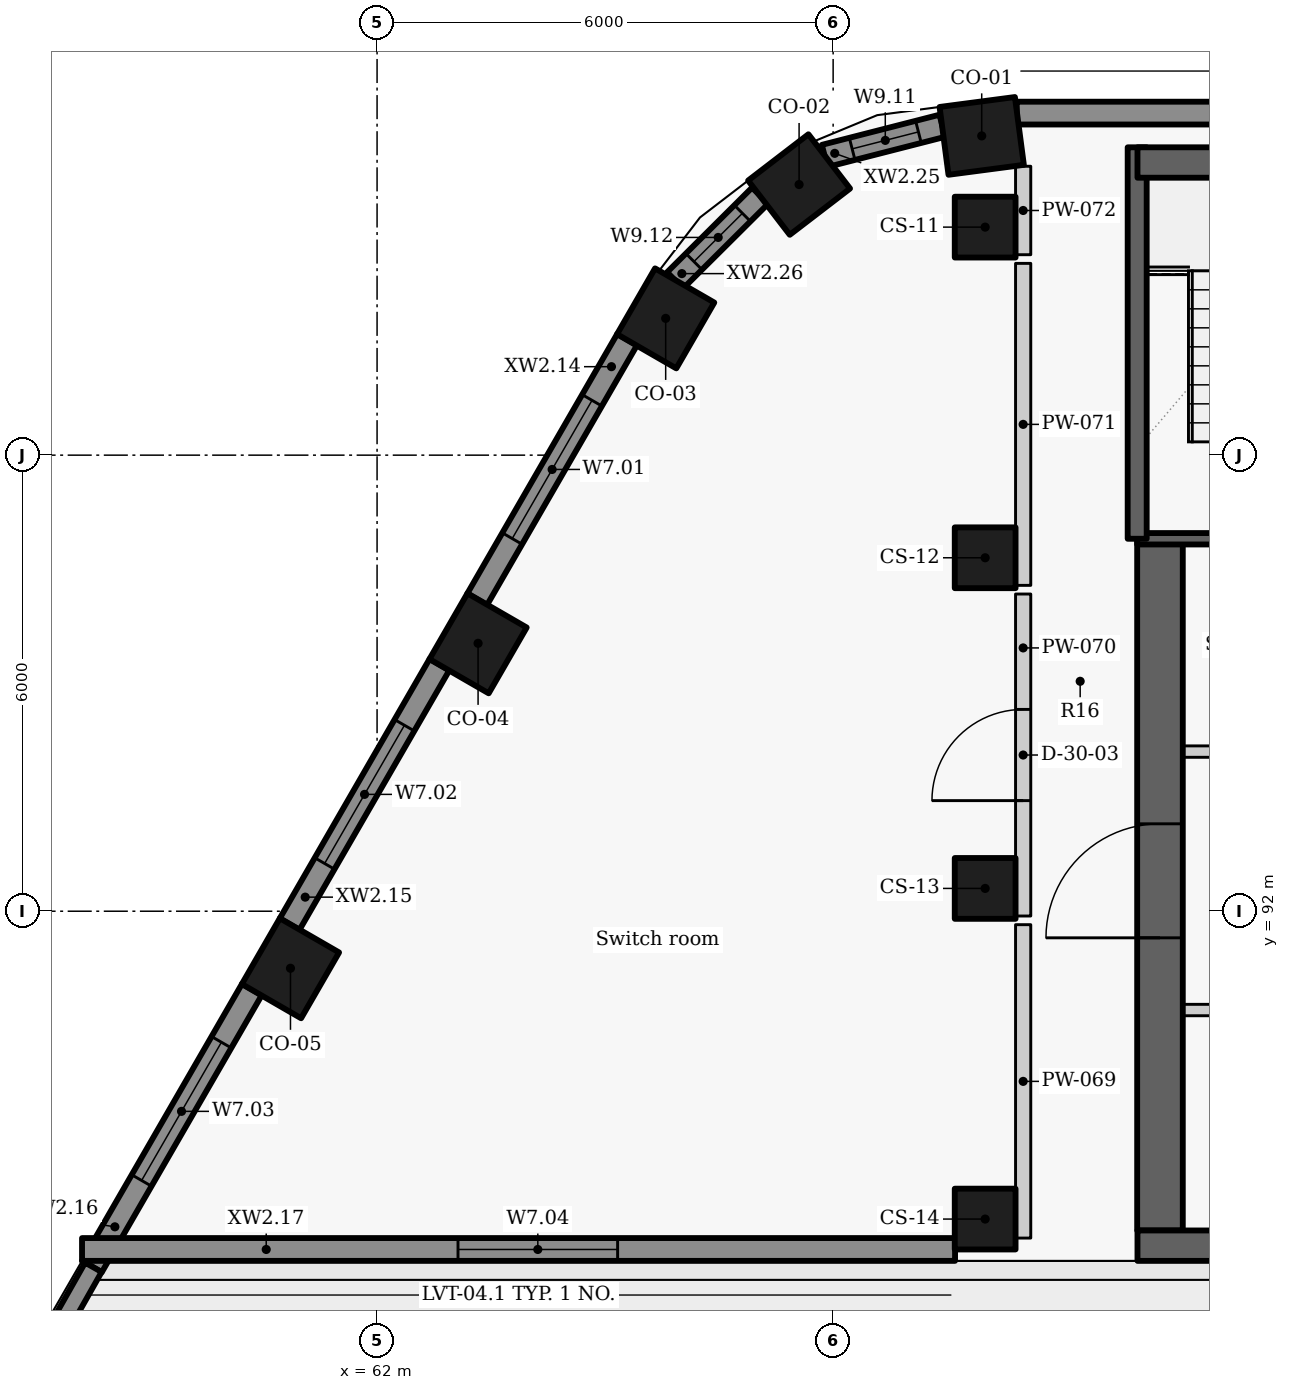
"""IFC4 building model, lengths in metres.
Left out: names, types, materials, properties, quantities, classifications, styles, units other than length and angle.
Written with IfcOpenShell. Run it as: python <this file> out.ifc"""

import sys

from ifc_helpers import new_model, si_unit, direction, frame, frame_2d, origin, origin_2d, place, context, subcontext, project, spatial, rectangle, extrude, element, fill, save


model = new_model("IFC4")
c1 = context("Model", 3, precision=1e-05, world=origin(), true_north=direction((0.0, 1.0)))
c2 = subcontext(c1, "Body", "Model", "MODEL_VIEW")
j1 = project(units=[si_unit("LENGTHUNIT", "METRE"), si_unit("PLANEANGLEUNIT", "RADIAN")], contexts=[c1])
p1 = place(None, origin())
s1 = spatial("IfcSite", under=j1, at=p1, CompositionType="ELEMENT")
p2 = place(p1, origin())
s2 = spatial("IfcBuilding", under=s1, at=p2, CompositionType="ELEMENT")
p3 = place(p2, frame((0.0, 0.0, 276.0)))
s3 = spatial("IfcBuildingStorey", under=s2, at=p3, CompositionType="ELEMENT", Elevation=276.0)
for number, where, z_axis, x_axis in (
    (1, (69.955, 102.2, 0.0), (0.0, 0.0, 1.0), (-0.991, -0.131, 0.0)),
    (2, (67.552, 101.56, 0.0), (0.0, 0.0, 1.0), (-0.793, -0.609, 0.0)),
    (3, (65.797, 99.8, 0.0), (0.0, 0.0, 1.0), (-0.5, -0.866, 0.0)),
    (4, (63.329, 95.525, 0.0), (0.0, 0.0, 1.0), (-0.5, -0.866, 0.0)),
    (5, (60.861, 91.25, 0.0), (0.0, 0.0, 1.0), (-0.5, -0.866, 0.0)),
):
    element("IfcColumn", number, at=place(p3, frame(where, z_axis=z_axis, x_axis=x_axis)), inside=s3, PredefinedType="COLUMN", context=c2, shape_type="SweptSolid", body=[
        extrude(rectangle(XDim=1.0, YDim=0.9, at=origin_2d()), origin(), (0.0, 0.0, 1.0), 3.6),
    ])
for number, where, z_axis, x_axis in (
    (6, (70.0, 101.0, 0.0), (0.0, 0.0, 1.0), (0.0, -1.0, 0.0)),
    (7, (70.0, 96.65, 0.0), (0.0, 0.0, 1.0), (0.0, -1.0, 0.0)),
    (8, (70.0, 92.3, 0.0), (0.0, 0.0, 1.0), (0.0, -1.0, 0.0)),
    (9, (70.0, 87.95, 0.0), (0.0, 0.0, 1.0), (0.0, -1.0, 0.0)),
):
    element("IfcColumn", number, at=place(p3, frame(where, z_axis=z_axis, x_axis=x_axis)), inside=s3, PredefinedType="COLUMN", context=c2, shape_type="SweptSolid", body=[
        extrude(rectangle(XDim=0.8, YDim=0.8, at=origin_2d()), origin(), (0.0, 0.0, 1.0), 3.6),
    ])
p4 = place(p3, frame((65.289, 99.52, 0.0), z_axis=(0.0, 0.0, 1.0), x_axis=(-0.499986771468, -0.866033041146, 0.0)))
e10 = element("IfcWall", 10, at=p4, inside=s3, PredefinedType="SOLIDWALL", context=c2, shape_type="SweptSolid", body=[
    extrude(rectangle(XDim=3.944, YDim=0.3, at=frame_2d((1.972, 0.0))), origin(), (0.0, 0.0, 1.0), 2.725),
])
p5 = place(p4, frame((0.922, 0.0, 0.9)))
e11 = element("IfcOpeningElement", 11, at=p5, cuts=e10, PredefinedType="OPENING", context=c2, shape_type="SweptSolid", body=[
    extrude(rectangle(XDim=2.1, YDim=1.1, at=frame_2d((1.05, 0.55))), frame((0.0, 0.16, 0.0), z_axis=(0.0, -1.0, 0.0), x_axis=(1.0, 0.0, 0.0)), (0.0, 0.0, 1.0), 0.32),
])
p6 = place(p3, frame((62.821, 95.245, 0.0), z_axis=(0.0, 0.0, 1.0), x_axis=(-0.499986771468, -0.866033041146, 0.0)))
e12 = element("IfcWall", 12, at=p6, inside=s3, PredefinedType="SOLIDWALL", context=c2, shape_type="SweptSolid", body=[
    extrude(rectangle(XDim=3.944, YDim=0.3, at=frame_2d((1.972, 0.0))), origin(), (0.0, 0.0, 1.0), 2.725),
])
p7 = place(p6, frame((0.922, 0.0, 0.9)))
e13 = element("IfcOpeningElement", 13, at=p7, cuts=e12, PredefinedType="OPENING", context=c2, shape_type="SweptSolid", body=[
    extrude(rectangle(XDim=2.1, YDim=1.1, at=frame_2d((1.05, 0.55))), frame((0.0, 0.16, 0.0), z_axis=(0.0, -1.0, 0.0), x_axis=(1.0, 0.0, 0.0)), (0.0, 0.0, 1.0), 0.32),
])
p8 = place(p3, frame((60.353, 90.97, 0.0), z_axis=(0.0, 0.0, 1.0), x_axis=(-0.499981865284, -0.866035873614, 0.0)))
e14 = element("IfcWall", 14, at=p8, inside=s3, PredefinedType="SOLIDWALL", context=c2, shape_type="SweptSolid", body=[
    extrude(rectangle(XDim=4.209, YDim=0.3, at=frame_2d((2.104, 0.0))), origin(), (0.0, 0.0, 1.0), 2.725),
])
p9 = place(p8, frame((0.801, 0.0, 0.9)))
e15 = element("IfcOpeningElement", 15, at=p9, cuts=e14, PredefinedType="OPENING", context=c2, shape_type="SweptSolid", body=[
    extrude(rectangle(XDim=2.1, YDim=1.1, at=frame_2d((1.05, 0.55))), frame((0.0, 0.16, 0.0), z_axis=(0.0, -1.0, 0.0), x_axis=(1.0, 0.0, 0.0)), (0.0, 0.0, 1.0), 0.32),
])
p10 = place(p3, frame((58.118, 87.55, 0.0), z_axis=(0.0, 0.0, 1.0), x_axis=(1.0, 0.0, 0.0)))
e16 = element("IfcWall", 16, at=p10, inside=s3, PredefinedType="SOLIDWALL", context=c2, shape_type="SweptSolid", body=[
    extrude(rectangle(XDim=11.486, YDim=0.3, at=frame_2d((5.743, 0.0))), origin(), (0.0, 0.0, 1.0), 2.725),
])
p11 = place(p10, frame((4.946, 0.0, 0.9)))
e17 = element("IfcOpeningElement", 17, at=p11, cuts=e16, PredefinedType="OPENING", context=c2, shape_type="SweptSolid", body=[
    extrude(rectangle(XDim=2.1, YDim=1.1, at=frame_2d((1.05, 0.55))), frame((0.0, 0.16, 0.0), z_axis=(0.0, -1.0, 0.0), x_axis=(1.0, 0.0, 0.0)), (0.0, 0.0, 1.0), 0.32),
])
p12 = place(p3, frame((89.549, 102.5, 0.0), z_axis=(0.0, 0.0, 1.0), x_axis=(-1.0, 0.0, 0.0)))
e18 = element("IfcWall", 18, at=p12, inside=s3, PredefinedType="SOLIDWALL", context=c2, shape_type="SweptSolid", body=[
    extrude(rectangle(XDim=19.134, YDim=0.3, at=frame_2d((9.567, 0.0))), origin(), (0.0, 0.0, 1.0), 2.725),
])
p13 = place(p3, frame((69.437, 102.333, 0.0), z_axis=(0.0, 0.0, 1.0), x_axis=(-0.968770279168, -0.247959968947, 0.0)))
e19 = element("IfcWall", 19, at=p13, inside=s3, PredefinedType="SOLIDWALL", context=c2, shape_type="SweptSolid", body=[
    extrude(rectangle(XDim=1.598, YDim=0.3, at=frame_2d((0.799, 0.0))), origin(), (0.0, 0.0, 1.0), 2.725),
])
p14 = place(p13, frame((0.325, 0.0, 0.9)))
e20 = element("IfcOpeningElement", 20, at=p14, cuts=e19, PredefinedType="OPENING", context=c2, shape_type="SweptSolid", body=[
    extrude(rectangle(XDim=0.9, YDim=1.1, at=frame_2d((0.45, 0.55))), frame((0.0, 0.16, 0.0), z_axis=(0.0, -1.0, 0.0), x_axis=(1.0, 0.0, 0.0)), (0.0, 0.0, 1.0), 0.32),
])
p15 = place(p3, frame((67.039, 101.414, 0.0), z_axis=(0.0, 0.0, 1.0), x_axis=(-0.708575326337, -0.705635179754, 0.0)))
e21 = element("IfcWall", 21, at=p15, inside=s3, PredefinedType="SOLIDWALL", context=c2, shape_type="SweptSolid", body=[
    extrude(rectangle(XDim=1.578, YDim=0.3, at=frame_2d((0.789, 0.0))), origin(), (0.0, 0.0, 1.0), 2.725),
])
p16 = place(p15, frame((0.328, 0.0, 0.9)))
e22 = element("IfcOpeningElement", 22, at=p16, cuts=e21, PredefinedType="OPENING", context=c2, shape_type="SweptSolid", body=[
    extrude(rectangle(XDim=0.9, YDim=1.1, at=frame_2d((0.45, 0.55))), frame((0.0, 0.16, 0.0), z_axis=(0.0, -1.0, 0.0), x_axis=(1.0, 0.0, 0.0)), (0.0, 0.0, 1.0), 0.32),
])
p17 = place(p3, frame((58.268, 87.316, 0.0), z_axis=(0.0, 0.0, 1.0), x_axis=(-0.492736734633, -0.870178435922, 0.0)))
e23 = element("IfcWall", 23, at=p17, inside=s3, PredefinedType="PARAPET", context=c2, shape_type="SweptSolid", body=[
    extrude(rectangle(XDim=5.918, YDim=0.25, at=frame_2d((2.959, 0.0))), origin(), (0.0, 0.0, 1.0), 1.1),
])
p18 = place(p3, frame((85.4, 90.7, 0.0), z_axis=(0.0, 0.0, 1.0), x_axis=(-1.0, 0.0, 0.0)))
e24 = element("IfcWall", 24, at=p18, inside=s3, PredefinedType="PARTITIONING", context=c2, shape_type="SweptSolid", body=[
    extrude(rectangle(XDim=13.4, YDim=0.15, at=frame_2d((6.7, 0.0))), origin(), (0.0, 0.0, 1.0), 3.325),
])
p19 = place(p18, frame((11.325, 0.0, 0.0)))
e25 = element("IfcOpeningElement", 25, at=p19, cuts=e24, PredefinedType="OPENING", context=c2, shape_type="SweptSolid", body=[
    extrude(rectangle(XDim=0.9, YDim=2.1, at=frame_2d((0.45, 1.05))), frame((0.0, 0.085, 0.0), z_axis=(0.0, -1.0, 0.0), x_axis=(1.0, 0.0, 0.0)), (0.0, 0.0, 1.0), 0.17),
])
p20 = place(p18, frame((9.0, 0.0, 0.0)))
e26 = element("IfcOpeningElement", 26, at=p20, cuts=e24, PredefinedType="OPENING", context=c2, shape_type="SweptSolid", body=[
    extrude(rectangle(XDim=0.9, YDim=2.1, at=frame_2d((0.45, 1.05))), frame((0.0, 0.085, 0.0), z_axis=(0.0, -1.0, 0.0), x_axis=(1.0, 0.0, 0.0)), (0.0, 0.0, 1.0), 0.17),
])
p21 = place(p18, frame((6.3, 0.0, 0.0)))
e27 = element("IfcOpeningElement", 27, at=p21, cuts=e24, PredefinedType="OPENING", context=c2, shape_type="SweptSolid", body=[
    extrude(rectangle(XDim=0.9, YDim=2.1, at=frame_2d((0.45, 1.05))), frame((0.0, 0.085, 0.0), z_axis=(0.0, -1.0, 0.0), x_axis=(1.0, 0.0, 0.0)), (0.0, 0.0, 1.0), 0.17),
])
p22 = place(p18, frame((3.6, 0.0, 0.0)))
e28 = element("IfcOpeningElement", 28, at=p22, cuts=e24, PredefinedType="OPENING", context=c2, shape_type="SweptSolid", body=[
    extrude(rectangle(XDim=0.9, YDim=2.1, at=frame_2d((0.45, 1.05))), frame((0.0, 0.085, 0.0), z_axis=(0.0, -1.0, 0.0), x_axis=(1.0, 0.0, 0.0)), (0.0, 0.0, 1.0), 0.17),
])
p23 = place(p18, frame((0.9, 0.0, 0.0)))
e29 = element("IfcOpeningElement", 29, at=p23, cuts=e24, PredefinedType="OPENING", context=c2, shape_type="SweptSolid", body=[
    extrude(rectangle(XDim=0.9, YDim=2.1, at=frame_2d((0.45, 1.05))), frame((0.0, 0.085, 0.0), z_axis=(0.0, -1.0, 0.0), x_axis=(1.0, 0.0, 0.0)), (0.0, 0.0, 1.0), 0.17),
])
p24 = place(p3, frame((72.3, 87.8, -0.275), z_axis=(0.0, 0.0, 1.0), x_axis=(0.0, 1.0, 0.0)))
e30 = element("IfcWall", 30, at=p24, inside=s3, PredefinedType="SHEAR", context=c2, shape_type="SweptSolid", body=[
    extrude(rectangle(XDim=9.1, YDim=0.6, at=frame_2d((4.55, 0.0))), origin(), (0.0, 0.0, 1.0), 3.6),
])
p25 = place(p24, frame((3.85, 0.0, 0.275)))
e31 = element("IfcOpeningElement", 31, at=p25, cuts=e30, PredefinedType="OPENING", context=c2, shape_type="SweptSolid", body=[
    extrude(rectangle(XDim=1.5, YDim=2.1, at=frame_2d((0.75, 1.05))), frame((0.0, 0.31, 0.0), z_axis=(0.0, -1.0, 0.0), x_axis=(1.0, 0.0, 0.0)), (0.0, 0.0, 1.0), 0.62),
])
p26 = place(p3, frame((72.0, 94.1, 0.0), z_axis=(0.0, 0.0, 1.0), x_axis=(1.0, 0.0, 0.0)))
e32 = element("IfcWall", 32, at=p26, inside=s3, PredefinedType="PARTITIONING", context=c2, shape_type="SweptSolid", body=[
    extrude(rectangle(XDim=10.703, YDim=0.15, at=frame_2d((5.352, 0.0))), origin(), (0.0, 0.0, 1.0), 3.325),
])
p27 = place(p26, frame((1.075, 0.0, 0.0)))
e33 = element("IfcOpeningElement", 33, at=p27, cuts=e32, PredefinedType="OPENING", context=c2, shape_type="SweptSolid", body=[
    extrude(rectangle(XDim=1.1, YDim=2.1, at=frame_2d((0.55, 1.05))), frame((0.0, 0.085, 0.0), z_axis=(0.0, -1.0, 0.0), x_axis=(1.0, 0.0, 0.0)), (0.0, 0.0, 1.0), 0.17),
])
p28 = place(p26, frame((3.5, 0.0, 0.0)))
e34 = element("IfcOpeningElement", 34, at=p28, cuts=e32, PredefinedType="OPENING", context=c2, shape_type="SweptSolid", body=[
    extrude(rectangle(XDim=0.9, YDim=2.1, at=frame_2d((0.45, 1.05))), frame((0.0, 0.085, 0.0), z_axis=(0.0, -1.0, 0.0), x_axis=(1.0, 0.0, 0.0)), (0.0, 0.0, 1.0), 0.17),
])
p29 = place(p26, frame((6.05, 0.0, 0.0)))
e35 = element("IfcOpeningElement", 35, at=p29, cuts=e32, PredefinedType="OPENING", context=c2, shape_type="SweptSolid", body=[
    extrude(rectangle(XDim=1.2, YDim=2.1, at=frame_2d((0.6, 1.05))), frame((0.0, 0.085, 0.0), z_axis=(0.0, -1.0, 0.0), x_axis=(1.0, 0.0, 0.0)), (0.0, 0.0, 1.0), 0.17),
])
p30 = place(p26, frame((8.9, 0.0, 0.0)))
e36 = element("IfcOpeningElement", 36, at=p30, cuts=e32, PredefinedType="OPENING", context=c2, shape_type="SweptSolid", body=[
    extrude(rectangle(XDim=0.9, YDim=2.1, at=frame_2d((0.45, 1.05))), frame((0.0, 0.085, 0.0), z_axis=(0.0, -1.0, 0.0), x_axis=(1.0, 0.0, 0.0)), (0.0, 0.0, 1.0), 0.17),
])
p31 = place(p3, frame((74.6, 96.9, -0.275), z_axis=(0.0, 0.0, 1.0), x_axis=(-1.0, 0.0, 0.0)))
e37 = element("IfcWall", 37, at=p31, inside=s3, PredefinedType="SHEAR", context=c2, shape_type="SweptSolid", body=[
    extrude(rectangle(XDim=2.6, YDim=0.15, at=frame_2d((1.3, 0.0))), origin(), (0.0, 0.0, 1.0), 3.6),
])
p32 = place(p31, frame((0.37, 0.0, 0.275)))
e38 = element("IfcOpeningElement", 38, at=p32, cuts=e37, PredefinedType="OPENING", context=c2, shape_type="SweptSolid", body=[
    extrude(rectangle(XDim=1.1, YDim=2.1, at=frame_2d((0.55, 1.05))), frame((0.0, 0.085, 0.0), z_axis=(0.0, -1.0, 0.0), x_axis=(1.0, 0.0, 0.0)), (0.0, 0.0, 1.0), 0.17),
])
p33 = place(p3, frame((72.0, 96.9, -0.275), z_axis=(0.0, 0.0, 1.0), x_axis=(0.0, 1.0, 0.0)))
e39 = element("IfcWall", 39, at=p33, inside=s3, PredefinedType="SHEAR", context=c2, shape_type="SweptSolid", body=[
    extrude(rectangle(XDim=5.15, YDim=0.25, at=frame_2d((2.575, 0.0))), origin(), (0.0, 0.0, 1.0), 3.6),
])
p34 = place(p3, frame((70.5, 87.7, 0.0), z_axis=(0.0, 0.0, 1.0), x_axis=(0.0, 1.0, 0.0)))
e40 = element("IfcWall", 40, at=p34, inside=s3, PredefinedType="PARTITIONING", context=c2, shape_type="SweptSolid", body=[
    extrude(rectangle(XDim=4.123, YDim=0.2, at=frame_2d((2.062, 0.0))), origin(), (0.0, 0.0, 1.0), 3.325),
])
p35 = place(p3, frame((70.5, 91.937, 0.0), z_axis=(0.0, 0.0, 1.0), x_axis=(0.0, 1.0, 0.0)))
e41 = element("IfcWall", 41, at=p35, inside=s3, PredefinedType="PARTITIONING", context=c2, shape_type="SweptSolid", body=[
    extrude(rectangle(XDim=4.236, YDim=0.2, at=frame_2d((2.118, 0.0))), origin(), (0.0, 0.0, 1.0), 3.325),
])
p36 = place(p35, frame((1.518, 0.0, 0.0)))
e42 = element("IfcOpeningElement", 42, at=p36, cuts=e41, PredefinedType="OPENING", context=c2, shape_type="SweptSolid", body=[
    extrude(rectangle(XDim=1.2, YDim=2.1, at=frame_2d((0.6, 1.05))), frame((0.0, 0.11, 0.0), z_axis=(0.0, -1.0, 0.0), x_axis=(1.0, 0.0, 0.0)), (0.0, 0.0, 1.0), 0.22),
])
p37 = place(p3, frame((70.5, 96.287, 0.0), z_axis=(0.0, 0.0, 1.0), x_axis=(0.0, 1.0, 0.0)))
e43 = element("IfcWall", 43, at=p37, inside=s3, PredefinedType="PARTITIONING", context=c2, shape_type="SweptSolid", body=[
    extrude(rectangle(XDim=4.236, YDim=0.2, at=frame_2d((2.118, 0.0))), origin(), (0.0, 0.0, 1.0), 3.325),
])
p38 = place(p3, frame((70.5, 100.637, 0.0), z_axis=(0.0, 0.0, 1.0), x_axis=(0.0, 1.0, 0.0)))
e44 = element("IfcWall", 44, at=p38, inside=s3, PredefinedType="PARTITIONING", context=c2, shape_type="SweptSolid", body=[
    extrude(rectangle(XDim=1.164, YDim=0.2, at=frame_2d((0.582, 0.0))), origin(), (0.0, 0.0, 1.0), 3.325),
])
p39 = place(p3, frame((72.004, 87.6, -0.275), z_axis=(0.0, 0.0, 1.0), x_axis=(1.0, 0.0, 0.0)))
e45 = element("IfcWall", 45, at=p39, inside=s3, PredefinedType="SHEAR", context=c2, shape_type="SweptSolid", body=[
    extrude(rectangle(XDim=13.396, YDim=0.4, at=frame_2d((6.698, 0.0))), origin(), (0.0, 0.0, 1.0), 3.6),
])
p40 = place(p3, frame((72.004, 101.85, -0.275), z_axis=(0.0, 0.0, 1.0), x_axis=(1.0, 0.0, 0.0)))
e46 = element("IfcWall", 46, at=p40, inside=s3, PredefinedType="SHEAR", context=c2, shape_type="SweptSolid", body=[
    extrude(rectangle(XDim=15.992, YDim=0.4, at=frame_2d((7.996, 0.0))), origin(), (0.0, 0.0, 1.0), 3.6),
])
p41 = place(p5, origin())
e47 = element("IfcWindow", 47, at=p41, inside=s3, PartitioningType="SINGLE_PANEL", PredefinedType="WINDOW", context=c2, shape_type="SweptSolid", body=[
    extrude(rectangle(XDim=2.1, YDim=1.1, at=frame_2d((1.05, 0.55))), frame((0.0, 0.03, 0.0), z_axis=(0.0, -1.0, 0.0), x_axis=(1.0, 0.0, 0.0)), (0.0, 0.0, 1.0), 0.06),
])
fill(e11, e47)
p42 = place(p7, origin())
e48 = element("IfcWindow", 48, at=p42, inside=s3, PartitioningType="SINGLE_PANEL", PredefinedType="WINDOW", context=c2, shape_type="SweptSolid", body=[
    extrude(rectangle(XDim=2.1, YDim=1.1, at=frame_2d((1.05, 0.55))), frame((0.0, 0.03, 0.0), z_axis=(0.0, -1.0, 0.0), x_axis=(1.0, 0.0, 0.0)), (0.0, 0.0, 1.0), 0.06),
])
fill(e13, e48)
p43 = place(p9, origin())
e49 = element("IfcWindow", 49, at=p43, inside=s3, PartitioningType="SINGLE_PANEL", PredefinedType="WINDOW", context=c2, shape_type="SweptSolid", body=[
    extrude(rectangle(XDim=2.1, YDim=1.1, at=frame_2d((1.05, 0.55))), frame((0.0, 0.03, 0.0), z_axis=(0.0, -1.0, 0.0), x_axis=(1.0, 0.0, 0.0)), (0.0, 0.0, 1.0), 0.06),
])
fill(e15, e49)
p44 = place(p11, origin())
e50 = element("IfcWindow", 50, at=p44, inside=s3, PartitioningType="SINGLE_PANEL", PredefinedType="WINDOW", context=c2, shape_type="SweptSolid", body=[
    extrude(rectangle(XDim=2.1, YDim=1.1, at=frame_2d((1.05, 0.55))), frame((0.0, 0.03, 0.0), z_axis=(0.0, -1.0, 0.0), x_axis=(1.0, 0.0, 0.0)), (0.0, 0.0, 1.0), 0.06),
])
fill(e17, e50)
p45 = place(p14, origin())
e51 = element("IfcWindow", 51, at=p45, inside=s3, PartitioningType="SINGLE_PANEL", PredefinedType="WINDOW", context=c2, shape_type="SweptSolid", body=[
    extrude(rectangle(XDim=0.9, YDim=1.1, at=frame_2d((0.45, 0.55))), frame((0.0, 0.03, 0.0), z_axis=(0.0, -1.0, 0.0), x_axis=(1.0, 0.0, 0.0)), (0.0, 0.0, 1.0), 0.06),
])
fill(e20, e51)
p46 = place(p16, origin())
e52 = element("IfcWindow", 52, at=p46, inside=s3, PartitioningType="SINGLE_PANEL", PredefinedType="WINDOW", context=c2, shape_type="SweptSolid", body=[
    extrude(rectangle(XDim=0.9, YDim=1.1, at=frame_2d((0.45, 0.55))), frame((0.0, 0.03, 0.0), z_axis=(0.0, -1.0, 0.0), x_axis=(1.0, 0.0, 0.0)), (0.0, 0.0, 1.0), 0.06),
])
fill(e22, e52)
p47 = place(p36, origin())
e53 = element("IfcDoor", 53, at=p47, inside=s3, OperationType="SINGLE_SWING_LEFT", PredefinedType="DOOR", context=c2, shape_type="SweptSolid", body=[
    extrude(rectangle(XDim=1.2, YDim=2.1, at=frame_2d((0.6, 1.05))), frame((0.0, 0.025, 0.0), z_axis=(0.0, -1.0, 0.0), x_axis=(1.0, 0.0, 0.0)), (0.0, 0.0, 1.0), 0.05),
])
fill(e42, e53)
p48 = place(p25, origin())
e54 = element("IfcDoor", 54, at=p48, inside=s3, OperationType="DOUBLE_DOOR_SINGLE_SWING", PredefinedType="DOOR", context=c2, shape_type="SweptSolid", body=[
    extrude(rectangle(XDim=1.5, YDim=2.1, at=frame_2d((0.75, 1.05))), frame((0.0, 0.025, 0.0), z_axis=(0.0, -1.0, 0.0), x_axis=(1.0, 0.0, 0.0)), (0.0, 0.0, 1.0), 0.05),
])
fill(e31, e54)
save(model, sys.argv[1])
